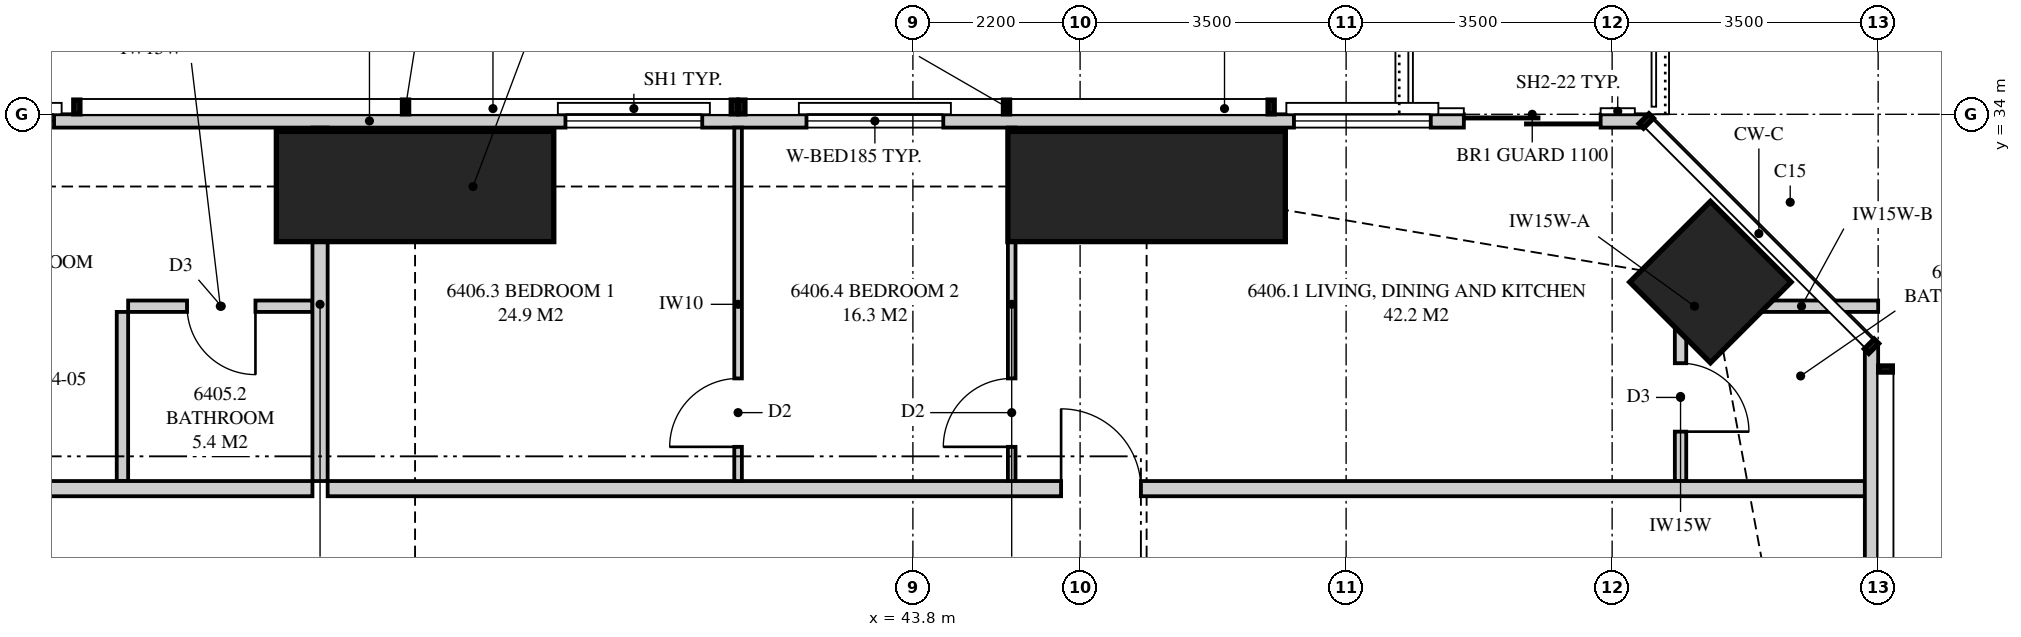
"""IFC4 building model, lengths in metres.
Left out: names, types, materials, properties, quantities, classifications, styles, units other than length and angle.
Written with IfcOpenShell. Run it as: python <this file> out.ifc"""

import sys

from ifc_helpers import new_model, si_unit, direction, frame, frame_2d, origin, origin_2d, place, context, subcontext, project, spatial, polyline, rectangle, outline, extrude, element, fill, save


model = new_model("IFC4")
c1 = context("Model", 3, precision=1e-05, world=origin(), true_north=direction((0.0, 1.0)))
c2 = subcontext(c1, "Body", "Model", "MODEL_VIEW")
j1 = project(units=[si_unit("LENGTHUNIT", "METRE"), si_unit("PLANEANGLEUNIT", "RADIAN")], contexts=[c1])
p1 = place(None, origin())
s1 = spatial("IfcSite", under=j1, at=p1, CompositionType="ELEMENT")
p2 = place(p1, origin())
s2 = spatial("IfcBuilding", under=s1, at=p2, CompositionType="ELEMENT")
p3 = place(p2, frame((0.0, 0.0, 235.45)))
s3 = spatial("IfcBuildingStorey", under=s2, at=p3, CompositionType="ELEMENT", Elevation=235.45)
p4 = place(p3, frame((54.293, 31.793, 0.0), z_axis=(0.0, 0.0, 1.0), x_axis=(0.707106781187, 0.707106781187, 0.0)))
e1 = element("IfcColumn", 1, at=p4, inside=s3, PredefinedType="COLUMN", context=c2, shape_type="SweptSolid", body=[
    extrude(rectangle(XDim=1.5, YDim=1.5, at=origin_2d()), origin(), (0.0, 0.0, 1.0), 3.5),
])
for number, where, z_axis, x_axis in (
    (2, (46.875, 33.05, 0.0), (0.0, 0.0, 1.0), (0.0, 1.0, 0.0)),
    (3, (37.25, 33.05, 0.0), (0.0, 0.0, 1.0), (0.0, 1.0, 0.0)),
):
    element("IfcColumn", number, at=place(p3, frame(where, z_axis=z_axis, x_axis=x_axis)), inside=s3, PredefinedType="COLUMN", context=c2, shape_type="SweptSolid", body=[
        extrude(rectangle(XDim=1.45, YDim=3.65, at=origin_2d()), origin(), (0.0, 0.0, 1.0), 3.5),
    ])
p5 = place(p3, frame((56.413, 3.051, 0.0), z_axis=(0.0, 0.0, 1.0), x_axis=(0.0, 1.0, 0.0)))
e4 = element("IfcWall", 4, at=p5, inside=s3, PredefinedType="SOLIDWALL", context=c2, shape_type="SweptSolid", body=[
    extrude(outline(polyline([(0.0, 0.0), (27.897, 0.0), (27.897, 3.26), (22.157, 3.26), (22.157, 2.3), (22.092, 2.3), (22.092, 3.26), (21.949, 3.26), (21.949, 2.3), (9.949, 2.3), (9.949, 3.26), (9.858, 3.26), (9.858, 2.3), (9.688, 2.3), (9.688, 3.26), (0.0, 3.26), (0.0, 0.0)])), frame((0.0, 0.087, 0.0), z_axis=(0.0, -1.0, 0.0), x_axis=(1.0, 0.0, 0.0)), (0.0, 0.0, 1.0), 0.175),
])
p6 = place(p5, frame((1.187, 0.0, 0.4)))
e5 = element("IfcOpeningElement", 5, at=p6, cuts=e4, PredefinedType="OPENING", context=c2, shape_type="SweptSolid", body=[
    extrude(rectangle(XDim=2.4, YDim=1.85, at=frame_2d((1.2, 0.925))), frame((0.0, 0.097, 0.0), z_axis=(0.0, -1.0, 0.0), x_axis=(1.0, 0.0, 0.0)), (0.0, 0.0, 1.0), 0.195),
])
p7 = place(p5, frame((11.897, 0.0, 0.4)))
e6 = element("IfcOpeningElement", 6, at=p7, cuts=e4, PredefinedType="OPENING", context=c2, shape_type="SweptSolid", body=[
    extrude(rectangle(XDim=1.8, YDim=1.85, at=frame_2d((0.9, 0.925))), frame((0.0, 0.097, 0.0), z_axis=(0.0, -1.0, 0.0), x_axis=(1.0, 0.0, 0.0)), (0.0, 0.0, 1.0), 0.195),
])
p8 = place(p5, frame((14.824, 0.0, 0.0)))
e7 = element("IfcOpeningElement", 7, at=p8, cuts=e4, PredefinedType="OPENING", context=c2, shape_type="SweptSolid", body=[
    extrude(rectangle(XDim=1.8, YDim=2.25, at=frame_2d((0.9, 1.125))), frame((0.0, 0.097, 0.0), z_axis=(0.0, -1.0, 0.0), x_axis=(1.0, 0.0, 0.0)), (0.0, 0.0, 1.0), 0.195),
])
p9 = place(p5, frame((18.224, 0.0, 0.4)))
e8 = element("IfcOpeningElement", 8, at=p9, cuts=e4, PredefinedType="OPENING", context=c2, shape_type="SweptSolid", body=[
    extrude(rectangle(XDim=1.8, YDim=1.85, at=frame_2d((0.9, 0.925))), frame((0.0, 0.097, 0.0), z_axis=(0.0, -1.0, 0.0), x_axis=(1.0, 0.0, 0.0)), (0.0, 0.0, 1.0), 0.195),
])
p10 = place(p3, frame((53.449, 33.913, 0.0), z_axis=(0.0, 0.0, 1.0), x_axis=(-1.0, 0.0, 0.0)))
e9 = element("IfcWall", 9, at=p10, inside=s3, PredefinedType="SOLIDWALL", context=c2, shape_type="SweptSolid", body=[
    extrude(outline(polyline([(0.0, 0.0), (33.597, 0.0), (33.597, 3.26), (26.039, 3.26), (26.039, 2.3), (25.955, 2.3), (25.955, 3.26), (25.824, 3.26), (25.824, 2.3), (6.574, 2.3), (6.574, 3.26), (6.442, 3.26), (6.442, 2.3), (6.359, 2.3), (6.359, 3.26), (0.0, 3.26), (0.0, 0.0)])), frame((0.0, 0.087, 0.0), z_axis=(0.0, -1.0, 0.0), x_axis=(1.0, 0.0, 0.0)), (0.0, 0.0, 1.0), 0.175),
])
p11 = place(p10, frame((0.6, 0.0, 0.0)))
e10 = element("IfcOpeningElement", 10, at=p11, cuts=e9, PredefinedType="OPENING", context=c2, shape_type="SweptSolid", body=[
    extrude(rectangle(XDim=1.8, YDim=2.25, at=frame_2d((0.9, 1.125))), frame((0.0, 0.097, 0.0), z_axis=(0.0, -1.0, 0.0), x_axis=(1.0, 0.0, 0.0)), (0.0, 0.0, 1.0), 0.195),
])
p12 = place(p10, frame((2.835, 0.0, 0.4)))
e11 = element("IfcOpeningElement", 11, at=p12, cuts=e9, PredefinedType="OPENING", context=c2, shape_type="SweptSolid", body=[
    extrude(rectangle(XDim=1.8, YDim=1.85, at=frame_2d((0.9, 0.925))), frame((0.0, 0.097, 0.0), z_axis=(0.0, -1.0, 0.0), x_axis=(1.0, 0.0, 0.0)), (0.0, 0.0, 1.0), 0.195),
])
p13 = place(p10, frame((9.249, 0.0, 0.4)))
e12 = element("IfcOpeningElement", 12, at=p13, cuts=e9, PredefinedType="OPENING", context=c2, shape_type="SweptSolid", body=[
    extrude(rectangle(XDim=1.8, YDim=1.85, at=frame_2d((0.9, 0.925))), frame((0.0, 0.097, 0.0), z_axis=(0.0, -1.0, 0.0), x_axis=(1.0, 0.0, 0.0)), (0.0, 0.0, 1.0), 0.195),
])
p14 = place(p10, frame((12.42, 0.0, 0.4)))
e13 = element("IfcOpeningElement", 13, at=p14, cuts=e9, PredefinedType="OPENING", context=c2, shape_type="SweptSolid", body=[
    extrude(rectangle(XDim=1.8, YDim=1.85, at=frame_2d((0.9, 0.925))), frame((0.0, 0.097, 0.0), z_axis=(0.0, -1.0, 0.0), x_axis=(1.0, 0.0, 0.0)), (0.0, 0.0, 1.0), 0.195),
])
p15 = place(p10, frame((20.949, 0.0, 0.4)))
e14 = element("IfcOpeningElement", 14, at=p15, cuts=e9, PredefinedType="OPENING", context=c2, shape_type="SweptSolid", body=[
    extrude(rectangle(XDim=2.4, YDim=1.85, at=frame_2d((1.2, 0.925))), frame((0.0, 0.097, 0.0), z_axis=(0.0, -1.0, 0.0), x_axis=(1.0, 0.0, 0.0)), (0.0, 0.0, 1.0), 0.195),
])
p16 = place(p10, frame((29.073, 0.0, 0.4)))
e15 = element("IfcOpeningElement", 15, at=p16, cuts=e9, PredefinedType="OPENING", context=c2, shape_type="SweptSolid", body=[
    extrude(rectangle(XDim=2.4, YDim=1.85, at=frame_2d((1.2, 0.925))), frame((0.0, 0.097, 0.0), z_axis=(0.0, -1.0, 0.0), x_axis=(1.0, 0.0, 0.0)), (0.0, 0.0, 1.0), 0.195),
])
p17 = place(p3, frame((36.0, 33.825, 0.0), z_axis=(0.0, 0.0, 1.0), x_axis=(0.0, -1.0, 0.0)))
e16 = element("IfcWall", 16, at=p17, inside=s3, PredefinedType="PARTITIONING", context=c2, shape_type="SweptSolid", body=[
    extrude(outline(polyline([(0.529, 2.3), (0.0, 2.3), (0.0, 0.0), (0.529, 0.0), (0.529, 0.281), (1.021, 0.281), (1.021, 0.0), (4.65, 0.0), (4.65, 2.66), (1.685, 2.66), (1.685, 2.3), (1.021, 2.3), (1.021, 2.019), (0.529, 2.019), (0.529, 2.3)])), frame((0.0, 0.1, 0.0), z_axis=(0.0, -1.0, 0.0), x_axis=(1.0, 0.0, 0.0)), (0.0, 0.0, 1.0), 0.2),
])
p18 = place(p3, frame((26.7, 29.075, 0.0), z_axis=(0.0, 0.0, 1.0), x_axis=(1.0, 0.0, 0.0)))
e17 = element("IfcWall", 17, at=p18, inside=s3, PredefinedType="PARTITIONING", context=c2, shape_type="SweptSolid", body=[
    extrude(outline(polyline([(0.0, 0.0), (9.2, 0.0), (9.2, 3.26), (2.235, 3.26), (2.235, 2.66), (0.0, 2.66), (0.0, 3.26), (0.0, 0.0)])), frame((0.0, 0.1, 0.0), z_axis=(0.0, -1.0, 0.0), x_axis=(1.0, 0.0, 0.0)), (0.0, 0.0, 1.0), 0.2),
])
p19 = place(p18, frame((4.1, 0.0, 0.0)))
e18 = element("IfcOpeningElement", 18, at=p19, cuts=e17, PredefinedType="OPENING", context=c2, shape_type="SweptSolid", body=[
    extrude(rectangle(XDim=1.05, YDim=2.2, at=frame_2d((0.525, 1.1))), frame((0.0, 0.11, 0.0), z_axis=(0.0, -1.0, 0.0), x_axis=(1.0, 0.0, 0.0)), (0.0, 0.0, 1.0), 0.22),
])
p20 = place(p3, frame((33.475, 31.475, 0.0), z_axis=(0.0, 0.0, 1.0), x_axis=(1.0, 0.0, 0.0)))
e19 = element("IfcWall", 19, at=p20, inside=s3, PredefinedType="PLUMBINGWALL", context=c2, shape_type="SweptSolid", body=[
    extrude(rectangle(XDim=2.425, YDim=0.15, at=frame_2d((1.212, 0.0))), origin(), (0.0, 0.0, 1.0), 3.26),
])
p21 = place(p20, frame((0.775, 0.0, 0.0)))
e20 = element("IfcOpeningElement", 20, at=p21, cuts=e19, PredefinedType="OPENING", context=c2, shape_type="SweptSolid", body=[
    extrude(rectangle(XDim=0.9, YDim=2.1, at=frame_2d((0.45, 1.05))), frame((0.0, 0.085, 0.0), z_axis=(0.0, -1.0, 0.0), x_axis=(1.0, 0.0, 0.0)), (0.0, 0.0, 1.0), 0.17),
])
p22 = place(p3, frame((33.4, 31.4, 0.0), z_axis=(0.0, 0.0, 1.0), x_axis=(0.0, -1.0, 0.0)))
e21 = element("IfcWall", 21, at=p22, inside=s3, PredefinedType="PLUMBINGWALL", context=c2, shape_type="SweptSolid", body=[
    extrude(rectangle(XDim=2.225, YDim=0.15, at=frame_2d((1.112, 0.0))), origin(), (0.0, 0.0, 1.0), 3.26),
])
p23 = place(p3, frame((36.1, 29.075, 0.0), z_axis=(0.0, 0.0, 1.0), x_axis=(1.0, 0.0, 0.0)))
e22 = element("IfcWall", 22, at=p23, inside=s3, PredefinedType="PARTITIONING", context=c2, shape_type="SweptSolid", body=[
    extrude(outline(polyline([(0.0, 0.0), (20.225, 0.0), (20.225, 3.26), (19.621, 3.26), (19.621, 2.3), (17.771, 2.3), (17.771, 3.26), (12.085, 3.26), (12.085, 2.66), (9.465, 2.66), (9.465, 3.26), (2.46, 3.26), (2.46, 2.66), (0.0, 2.66), (0.0, 3.26), (0.0, 0.0)])), frame((0.0, 0.1, 0.0), z_axis=(0.0, -1.0, 0.0), x_axis=(1.0, 0.0, 0.0)), (0.0, 0.0, 1.0), 0.2),
])
p24 = place(p23, frame((9.65, 0.0, 0.0)))
e23 = element("IfcOpeningElement", 23, at=p24, cuts=e22, PredefinedType="OPENING", context=c2, shape_type="SweptSolid", body=[
    extrude(rectangle(XDim=1.05, YDim=2.2, at=frame_2d((0.525, 1.1))), frame((0.0, 0.11, 0.0), z_axis=(0.0, -1.0, 0.0), x_axis=(1.0, 0.0, 0.0)), (0.0, 0.0, 1.0), 0.22),
])
p25 = place(p3, frame((53.975, 31.475, 0.0), z_axis=(0.0, 0.0, 1.0), x_axis=(1.0, 0.0, 0.0)))
e24 = element("IfcWall", 24, at=p25, inside=s3, PredefinedType="PLUMBINGWALL", context=c2, shape_type="SweptSolid", body=[
    extrude(rectangle(XDim=0.217, YDim=0.15, at=frame_2d((0.108, 0.0))), origin(), (0.0, 0.0, 1.0), 2.3),
])
p26 = place(p3, frame((54.483, 31.475, 0.0), z_axis=(0.0, 0.0, 1.0), x_axis=(1.0, 0.0, 0.0)))
e25 = element("IfcWall", 25, at=p26, inside=s3, PredefinedType="PLUMBINGWALL", context=c2, shape_type="SweptSolid", body=[
    extrude(outline(polyline([(0.768, 3.26), (0.768, 2.3), (0.407, 2.3), (0.396, 2.239), (0.0, 1.15), (0.396, 0.061), (0.407, 0.0), (2.017, 0.0), (2.017, 3.26), (0.768, 3.26)])), frame((0.0, 0.075, 0.0), z_axis=(0.0, -1.0, 0.0), x_axis=(1.0, 0.0, 0.0)), (0.0, 0.0, 1.0), 0.15),
])
p27 = place(p3, frame((53.9, 31.4, 0.0), z_axis=(0.0, 0.0, 1.0), x_axis=(0.0, -1.0, 0.0)))
e26 = element("IfcWall", 26, at=p27, inside=s3, PredefinedType="PLUMBINGWALL", context=c2, shape_type="SweptSolid", body=[
    extrude(outline(polyline([(0.0, 0.0), (2.225, 0.0), (2.225, 3.26), (2.225, 2.3), (0.438, 2.3), (0.0, 2.3), (0.0, 3.26), (0.0, 0.0)])), frame((0.0, 0.075, 0.0), z_axis=(0.0, -1.0, 0.0), x_axis=(1.0, 0.0, 0.0)), (0.0, 0.0, 1.0), 0.15),
])
p28 = place(p27, frame((0.675, 0.0, 0.0)))
e27 = element("IfcOpeningElement", 27, at=p28, cuts=e26, PredefinedType="OPENING", context=c2, shape_type="SweptSolid", body=[
    extrude(rectangle(XDim=0.9, YDim=2.1, at=frame_2d((0.45, 1.05))), frame((0.0, 0.085, 0.0), z_axis=(0.0, -1.0, 0.0), x_axis=(1.0, 0.0, 0.0)), (0.0, 0.0, 1.0), 0.17),
])
p29 = place(p3, frame((41.5, 33.825, 0.0), z_axis=(0.0, 0.0, 1.0), x_axis=(0.0, -1.0, 0.0)))
e28 = element("IfcWall", 28, at=p29, inside=s3, PredefinedType="PARTITIONING", context=c2, shape_type="SweptSolid", body=[
    extrude(outline(polyline([(0.0, 0.0), (4.65, 0.0), (4.65, 3.26), (1.635, 3.26), (1.635, 2.3), (0.0, 2.3), (0.0, 3.26), (0.0, 0.0)])), frame((0.0, 0.05, 0.0), z_axis=(0.0, -1.0, 0.0), x_axis=(1.0, 0.0, 0.0)), (0.0, 0.0, 1.0), 0.1),
])
p30 = place(p29, frame((3.3, 0.0, 0.0)))
e29 = element("IfcOpeningElement", 29, at=p30, cuts=e28, PredefinedType="OPENING", context=c2, shape_type="SweptSolid", body=[
    extrude(rectangle(XDim=0.9, YDim=2.1, at=frame_2d((0.45, 1.05))), frame((0.0, 0.06, 0.0), z_axis=(0.0, -1.0, 0.0), x_axis=(1.0, 0.0, 0.0)), (0.0, 0.0, 1.0), 0.12),
])
p31 = place(p3, frame((45.1, 33.825, 0.0), z_axis=(0.0, 0.0, 1.0), x_axis=(0.0, -1.0, 0.0)))
e30 = element("IfcWall", 30, at=p31, inside=s3, PredefinedType="PARTITIONING", context=c2, shape_type="SweptSolid", body=[
    extrude(outline(polyline([(0.0, 0.0), (4.65, 0.0), (4.65, 3.26), (1.635, 3.26), (1.635, 2.3), (0.0, 2.3), (0.0, 3.26), (0.0, 0.0)])), frame((0.0, 0.05, 0.0), z_axis=(0.0, -1.0, 0.0), x_axis=(1.0, 0.0, 0.0)), (0.0, 0.0, 1.0), 0.1),
])
p32 = place(p31, frame((3.3, 0.0, 0.0)))
e31 = element("IfcOpeningElement", 31, at=p32, cuts=e30, PredefinedType="OPENING", context=c2, shape_type="SweptSolid", body=[
    extrude(rectangle(XDim=0.9, YDim=2.1, at=frame_2d((0.45, 1.05))), frame((0.0, 0.06, 0.0), z_axis=(0.0, -1.0, 0.0), x_axis=(1.0, 0.0, 0.0)), (0.0, 0.0, 1.0), 0.12),
])
p33 = place(p11, origin())
e32 = element("IfcDoor", 32, at=p33, inside=s3, OperationType="SLIDING_TO_LEFT", PredefinedType="DOOR", context=c2, shape_type="SweptSolid", body=[
    extrude(rectangle(XDim=1.8, YDim=2.25, at=frame_2d((0.9, 1.125))), frame((0.0, 0.025, 0.0), z_axis=(0.0, -1.0, 0.0), x_axis=(1.0, 0.0, 0.0)), (0.0, 0.0, 1.0), 0.05),
])
fill(e10, e32)
p34 = place(p12, origin())
e33 = element("IfcWindow", 33, at=p34, inside=s3, PartitioningType="SINGLE_PANEL", PredefinedType="WINDOW", context=c2, shape_type="SweptSolid", body=[
    extrude(rectangle(XDim=1.8, YDim=1.85, at=frame_2d((0.9, 0.925))), frame((0.0, 0.03, 0.0), z_axis=(0.0, -1.0, 0.0), x_axis=(1.0, 0.0, 0.0)), (0.0, 0.0, 1.0), 0.06),
])
fill(e11, e33)
p35 = place(p13, origin())
e34 = element("IfcWindow", 34, at=p35, inside=s3, PartitioningType="SINGLE_PANEL", PredefinedType="WINDOW", context=c2, shape_type="SweptSolid", body=[
    extrude(rectangle(XDim=1.8, YDim=1.85, at=frame_2d((0.9, 0.925))), frame((0.0, 0.03, 0.0), z_axis=(0.0, -1.0, 0.0), x_axis=(1.0, 0.0, 0.0)), (0.0, 0.0, 1.0), 0.06),
])
fill(e12, e34)
p36 = place(p14, origin())
e35 = element("IfcWindow", 35, at=p36, inside=s3, PartitioningType="SINGLE_PANEL", PredefinedType="WINDOW", context=c2, shape_type="SweptSolid", body=[
    extrude(rectangle(XDim=1.8, YDim=1.85, at=frame_2d((0.9, 0.925))), frame((0.0, 0.03, 0.0), z_axis=(0.0, -1.0, 0.0), x_axis=(1.0, 0.0, 0.0)), (0.0, 0.0, 1.0), 0.06),
])
fill(e13, e35)
p37 = place(p15, origin())
e36 = element("IfcWindow", 36, at=p37, inside=s3, PartitioningType="SINGLE_PANEL", PredefinedType="WINDOW", context=c2, shape_type="SweptSolid", body=[
    extrude(rectangle(XDim=2.4, YDim=1.85, at=frame_2d((1.2, 0.925))), frame((0.0, 0.03, 0.0), z_axis=(0.0, -1.0, 0.0), x_axis=(1.0, 0.0, 0.0)), (0.0, 0.0, 1.0), 0.06),
])
fill(e14, e36)
p38 = place(p21, frame((0.9, 0.0, 0.0), z_axis=(0.0, 0.0, 1.0), x_axis=(-1.0, 0.0, 0.0)))
e37 = element("IfcDoor", 37, at=p38, inside=s3, OperationType="SINGLE_SWING_LEFT", PredefinedType="DOOR", context=c2, shape_type="SweptSolid", body=[
    extrude(rectangle(XDim=0.9, YDim=2.1, at=frame_2d((0.45, 1.05))), frame((0.0, 0.025, 0.0), z_axis=(0.0, -1.0, 0.0), x_axis=(1.0, 0.0, 0.0)), (0.0, 0.0, 1.0), 0.05),
])
fill(e20, e37)
p39 = place(p24, origin())
e38 = element("IfcDoor", 38, at=p39, inside=s3, OperationType="SINGLE_SWING_LEFT", PredefinedType="DOOR", context=c2, shape_type="SweptSolid", body=[
    extrude(rectangle(XDim=1.05, YDim=2.2, at=frame_2d((0.525, 1.1))), frame((0.0, 0.025, 0.0), z_axis=(0.0, -1.0, 0.0), x_axis=(1.0, 0.0, 0.0)), (0.0, 0.0, 1.0), 0.05),
])
fill(e23, e38)
p40 = place(p28, origin())
e39 = element("IfcDoor", 39, at=p40, inside=s3, OperationType="SINGLE_SWING_RIGHT", PredefinedType="DOOR", context=c2, shape_type="SweptSolid", body=[
    extrude(rectangle(XDim=0.9, YDim=2.1, at=frame_2d((0.45, 1.05))), frame((0.0, 0.025, 0.0), z_axis=(0.0, -1.0, 0.0), x_axis=(1.0, 0.0, 0.0)), (0.0, 0.0, 1.0), 0.05),
])
fill(e27, e39)
p41 = place(p30, frame((0.9, 0.0, 0.0), z_axis=(0.0, 0.0, 1.0), x_axis=(-1.0, 0.0, 0.0)))
e40 = element("IfcDoor", 40, at=p41, inside=s3, OperationType="SINGLE_SWING_LEFT", PredefinedType="DOOR", context=c2, shape_type="SweptSolid", body=[
    extrude(rectangle(XDim=0.9, YDim=2.1, at=frame_2d((0.45, 1.05))), frame((0.0, 0.025, 0.0), z_axis=(0.0, -1.0, 0.0), x_axis=(1.0, 0.0, 0.0)), (0.0, 0.0, 1.0), 0.05),
])
fill(e29, e40)
p42 = place(p32, frame((0.9, 0.0, 0.0), z_axis=(0.0, 0.0, 1.0), x_axis=(-1.0, 0.0, 0.0)))
e41 = element("IfcDoor", 41, at=p42, inside=s3, OperationType="SINGLE_SWING_LEFT", PredefinedType="DOOR", context=c2, shape_type="SweptSolid", body=[
    extrude(rectangle(XDim=0.9, YDim=2.1, at=frame_2d((0.45, 1.05))), frame((0.0, 0.025, 0.0), z_axis=(0.0, -1.0, 0.0), x_axis=(1.0, 0.0, 0.0)), (0.0, 0.0, 1.0), 0.05),
])
fill(e31, e41)
save(model, sys.argv[1])
